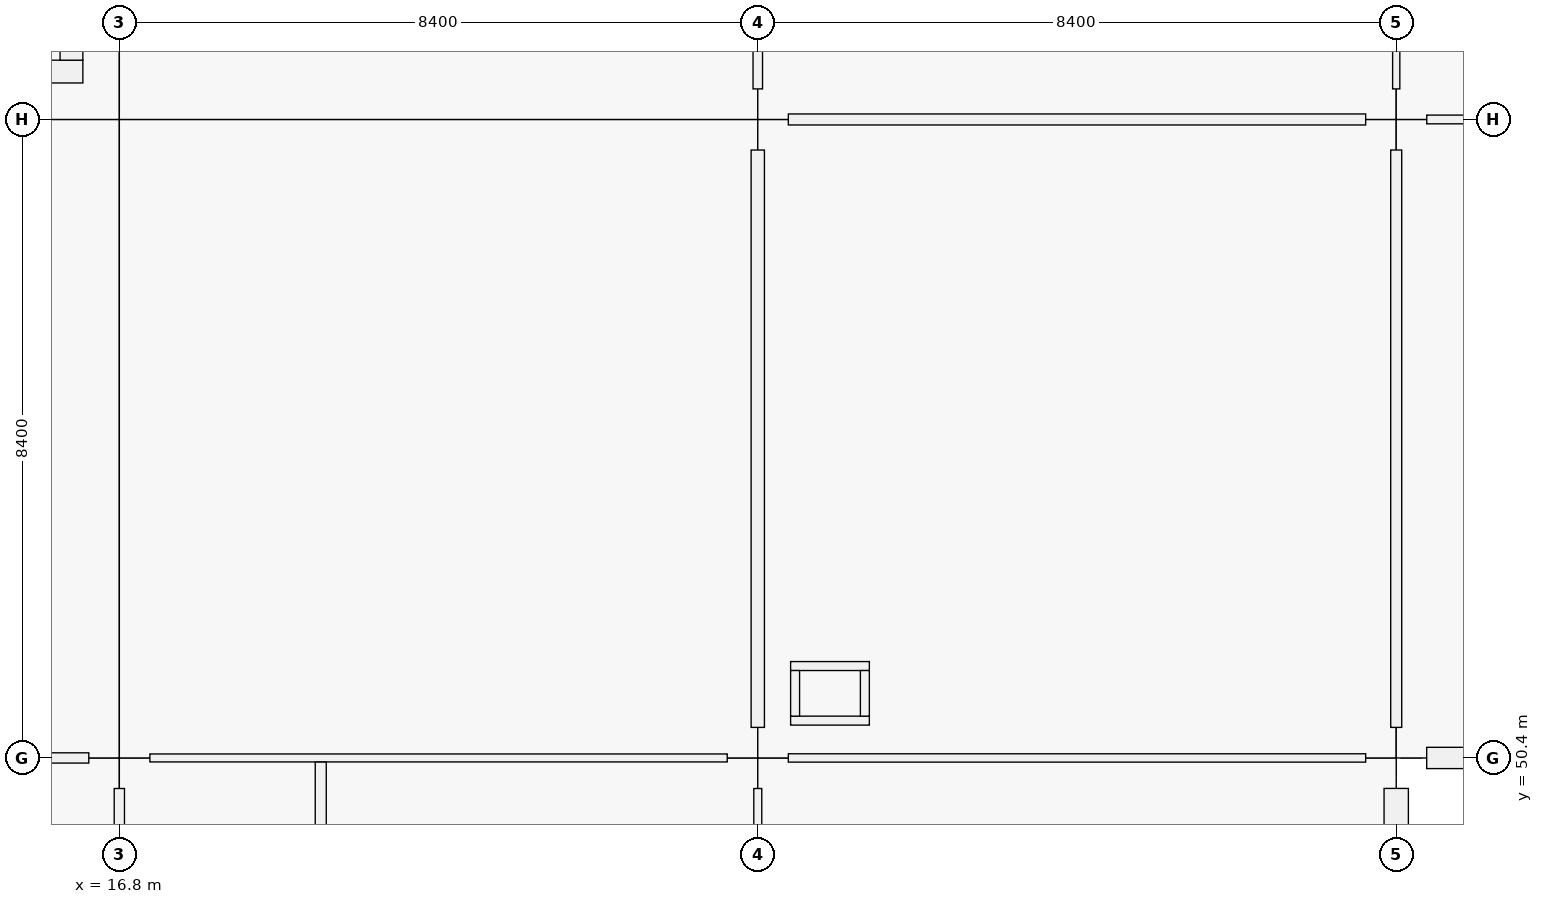
"""IFC4 building model, lengths in metres.
Left out: names, types, materials, properties, quantities, classifications, styles, units other than length and angle.
Written with IfcOpenShell. Run it as: python <this file> out.ifc"""

import sys

from ifc_helpers import new_model, si_unit, direction, frame, frame_2d, origin, origin_2d, place, context, subcontext, project, spatial, rectangle, extrude, element, fill, save


model = new_model("IFC4")
c1 = context("Model", 3, precision=1e-05, world=origin(), true_north=direction((0.0, 1.0)))
c2 = subcontext(c1, "Body", "Model", "MODEL_VIEW")
j1 = project(units=[si_unit("LENGTHUNIT", "METRE"), si_unit("PLANEANGLEUNIT", "RADIAN")], contexts=[c1])
p1 = place(None, origin())
s1 = spatial("IfcSite", under=j1, at=p1, CompositionType="ELEMENT")
p2 = place(p1, origin())
s2 = spatial("IfcBuilding", under=s1, at=p2, CompositionType="ELEMENT")
p3 = place(p2, frame((0.0, 0.0, 5.76)))
s3 = spatial("IfcBuildingStorey", under=s2, at=p3, CompositionType="ELEMENT", Elevation=5.76)
for number, where, z_axis, x_axis in (
    (1, (16.8, 50.4, 0.0), (0.0, 0.0, 1.0), (1.0, 0.0, 0.0)),
    (2, (16.8, 58.8, 0.0), (0.0, 0.0, 1.0), (1.0, 0.0, 0.0)),
    (3, (25.2, 50.4, 0.0), (0.0, 0.0, 1.0), (1.0, 0.0, 0.0)),
    (4, (25.2, 58.8, 0.0), (0.0, 0.0, 1.0), (1.0, 0.0, 0.0)),
    (5, (33.6, 50.4, 0.0), (0.0, 0.0, 1.0), (1.0, 0.0, 0.0)),
    (6, (33.6, 58.8, 0.0), (0.0, 0.0, 1.0), (1.0, 0.0, 0.0)),
):
    element("IfcColumn", number, at=place(p3, frame(where, z_axis=z_axis, x_axis=x_axis)), inside=s3, PredefinedType="COLUMN", context=c2, shape_type="SweptSolid", body=[
        extrude(rectangle(XDim=0.8, YDim=0.8, at=origin_2d()), origin(), (0.0, 0.0, 1.0), 4.5),
    ])
p4 = place(p3, frame((33.6, 49.999, 0.0), z_axis=(0.0, 0.0, 1.0), x_axis=(0.0, -1.0, 0.0)))
e7 = element("IfcWall", 7, at=p4, inside=s3, PredefinedType="SOLIDWALL", context=c2, shape_type="SweptSolid", body=[
    extrude(rectangle(XDim=7.598, YDim=0.32, at=frame_2d((3.799, 0.0))), origin(), (0.0, 0.0, 1.0), 3.4),
])
p5 = place(p4, frame((2.924, 0.0, 0.9)))
e8 = element("IfcOpeningElement", 8, at=p5, cuts=e7, PredefinedType="OPENING", context=c2, shape_type="SweptSolid", body=[
    extrude(rectangle(XDim=1.75, YDim=1.95, at=frame_2d((0.875, 0.975))), frame((0.0, 0.16, 0.0), z_axis=(0.0, -1.0, 0.0), x_axis=(1.0, 0.0, 0.0)), (0.0, 0.0, 1.0), 0.32),
])
p6 = place(p3, frame((41.649, 50.4, 0.0), z_axis=(0.0, 0.0, 1.0), x_axis=(-1.0, 0.0, 0.0)))
e9 = element("IfcWall", 9, at=p6, inside=s3, PredefinedType="SOLIDWALL", context=c2, shape_type="SweptSolid", body=[
    extrude(rectangle(XDim=7.648, YDim=0.28, at=frame_2d((3.824, 0.0))), origin(), (0.0, 0.0, 1.0), 3.4),
])
p7 = place(p3, frame((16.32, 59.43, 0.0), z_axis=(0.0, 0.0, 1.0), x_axis=(-1.0, 0.0, 0.0)))
e10 = element("IfcWall", 10, at=p7, inside=s3, PredefinedType="SHEAR", context=c2, shape_type="SweptSolid", body=[
    extrude(rectangle(XDim=7.44, YDim=0.3, at=frame_2d((3.72, 0.0))), origin(), (0.0, 0.0, 1.0), 4.5),
])
p8 = place(p7, frame((1.28, 0.0, 0.0)))
e11 = element("IfcOpeningElement", 11, at=p8, cuts=e10, PredefinedType="OPENING", context=c2, shape_type="SweptSolid", body=[
    extrude(rectangle(XDim=1.5, YDim=2.15, at=frame_2d((0.75, 1.075))), frame((0.0, 0.15, 0.0), z_axis=(0.0, -1.0, 0.0), x_axis=(1.0, 0.0, 0.0)), (0.0, 0.0, 1.0), 0.3),
])
p9 = place(p3, frame((16.17, 66.42, 0.0), z_axis=(0.0, 0.0, 1.0), x_axis=(0.0, -1.0, 0.0)))
e12 = element("IfcWall", 12, at=p9, inside=s3, PredefinedType="SHEAR", context=c2, shape_type="SweptSolid", body=[
    extrude(rectangle(XDim=6.84, YDim=0.3, at=frame_2d((3.42, 0.0))), origin(), (0.0, 0.0, 1.0), 4.5),
])
for number, where, z_axis, x_axis in (
    (13, (25.632, 50.891, 0.0), (0.0, 0.0, 1.0), (1.0, 0.0, 0.0)),
    (14, (25.632, 51.609, 0.0), (0.0, 0.0, 1.0), (1.0, 0.0, 0.0)),
):
    element("IfcWall", number, at=place(p3, frame(where, z_axis=z_axis, x_axis=x_axis)), inside=s3, PredefinedType="PARTITIONING", context=c2, shape_type="SweptSolid", body=[
        extrude(rectangle(XDim=1.036, YDim=0.118, at=frame_2d((0.518, 0.0))), origin(), (0.0, 0.0, 1.0), 3.48),
    ])
for number, where, z_axis, x_axis in (
    (15, (25.691, 50.95, 0.0), (0.0, 0.0, 1.0), (0.0, 1.0, 0.0)),
    (16, (26.609, 50.95, 0.0), (0.0, 0.0, 1.0), (0.0, 1.0, 0.0)),
):
    element("IfcWall", number, at=place(p3, frame(where, z_axis=z_axis, x_axis=x_axis)), inside=s3, PredefinedType="PARTITIONING", context=c2, shape_type="SweptSolid", body=[
        extrude(rectangle(XDim=0.6, YDim=0.118, at=frame_2d((0.3, 0.0))), origin(), (0.0, 0.0, 1.0), 3.48),
    ])
p10 = place(p3, frame((8.802, 50.4, 0.0), z_axis=(0.0, 0.0, 1.0), x_axis=(1.0, 0.0, 0.0)))
e17 = element("IfcWall", 17, at=p10, inside=s3, PredefinedType="PARTITIONING", context=c2, shape_type="SweptSolid", body=[
    extrude(rectangle(XDim=7.596, YDim=0.135, at=frame_2d((3.798, 0.0))), origin(), (0.0, 0.0, 1.0), 2.4),
])
p11 = place(p10, frame((3.328, 0.0, 0.0)))
e18 = element("IfcOpeningElement", 18, at=p11, cuts=e17, PredefinedType="OPENING", context=c2, shape_type="SweptSolid", body=[
    extrude(rectangle(XDim=0.94, YDim=2.15, at=frame_2d((0.47, 1.075))), frame((0.0, 0.067, 0.0), z_axis=(0.0, -1.0, 0.0), x_axis=(1.0, 0.0, 0.0)), (0.0, 0.0, 1.0), 0.135),
])
p12 = place(p3, frame((17.202, 50.4, 0.0), z_axis=(0.0, 0.0, 1.0), x_axis=(1.0, 0.0, 0.0)))
e19 = element("IfcWall", 19, at=p12, inside=s3, PredefinedType="PARTITIONING", context=c2, shape_type="SweptSolid", body=[
    extrude(rectangle(XDim=7.596, YDim=0.105, at=frame_2d((3.798, 0.0))), origin(), (0.0, 0.0, 1.0), 2.4),
])
p13 = place(p12, frame((0.583, 0.0, 0.0)))
e20 = element("IfcOpeningElement", 20, at=p13, cuts=e19, PredefinedType="OPENING", context=c2, shape_type="SweptSolid", body=[
    extrude(rectangle(XDim=0.96, YDim=2.1, at=frame_2d((0.48, 1.05))), frame((0.0, 0.052, 0.0), z_axis=(0.0, -1.0, 0.0), x_axis=(1.0, 0.0, 0.0)), (0.0, 0.0, 1.0), 0.105),
])
p14 = place(p12, frame((4.523, 0.0, 0.0)))
e21 = element("IfcOpeningElement", 21, at=p14, cuts=e19, PredefinedType="OPENING", context=c2, shape_type="SweptSolid", body=[
    extrude(rectangle(XDim=0.92, YDim=2.1, at=frame_2d((0.46, 1.05))), frame((0.0, 0.052, 0.0), z_axis=(0.0, -1.0, 0.0), x_axis=(1.0, 0.0, 0.0)), (0.0, 0.0, 1.0), 0.105),
])
p15 = place(p3, frame((25.602, 50.4, 0.0), z_axis=(0.0, 0.0, 1.0), x_axis=(1.0, 0.0, 0.0)))
e22 = element("IfcWall", 22, at=p15, inside=s3, PredefinedType="MOVABLE", context=c2, shape_type="SweptSolid", body=[
    extrude(rectangle(XDim=7.596, YDim=0.11, at=frame_2d((3.798, 0.0))), origin(), (0.0, 0.0, 1.0), 2.4),
])
p16 = place(p15, frame((3.258, 0.0, 0.0)))
e23 = element("IfcOpeningElement", 23, at=p16, cuts=e22, PredefinedType="OPENING", context=c2, shape_type="SweptSolid", body=[
    extrude(rectangle(XDim=1.08, YDim=2.22, at=frame_2d((0.54, 1.11))), frame((0.0, 0.055, 0.0), z_axis=(0.0, -1.0, 0.0), x_axis=(1.0, 0.0, 0.0)), (0.0, 0.0, 1.0), 0.11),
])
p17 = place(p3, frame((25.602, 58.8, 0.0), z_axis=(0.0, 0.0, 1.0), x_axis=(1.0, 0.0, 0.0)))
e24 = element("IfcWall", 24, at=p17, inside=s3, PredefinedType="PARTITIONING", context=c2, shape_type="SweptSolid", body=[
    extrude(rectangle(XDim=7.596, YDim=0.145, at=frame_2d((3.798, 0.0))), origin(), (0.0, 0.0, 1.0), 2.4),
])
p18 = place(p17, frame((3.268, 0.0, 0.0)))
e25 = element("IfcOpeningElement", 25, at=p18, cuts=e24, PredefinedType="OPENING", context=c2, shape_type="SweptSolid", body=[
    extrude(rectangle(XDim=1.06, YDim=2.22, at=frame_2d((0.53, 1.11))), frame((0.0, 0.073, 0.0), z_axis=(0.0, -1.0, 0.0), x_axis=(1.0, 0.0, 0.0)), (0.0, 0.0, 1.0), 0.145),
])
p19 = place(p3, frame((34.002, 58.8, 0.0), z_axis=(0.0, 0.0, 1.0), x_axis=(1.0, 0.0, 0.0)))
e26 = element("IfcWall", 26, at=p19, inside=s3, PredefinedType="PARTITIONING", context=c2, shape_type="SweptSolid", body=[
    extrude(rectangle(XDim=7.621, YDim=0.115, at=frame_2d((3.811, 0.0))), origin(), (0.0, 0.0, 1.0), 2.4),
])
p20 = place(p19, frame((3.28, 0.0, 0.0)))
e27 = element("IfcOpeningElement", 27, at=p20, cuts=e26, PredefinedType="OPENING", context=c2, shape_type="SweptSolid", body=[
    extrude(rectangle(XDim=1.06, YDim=2.22, at=frame_2d((0.53, 1.11))), frame((0.0, 0.058, 0.0), z_axis=(0.0, -1.0, 0.0), x_axis=(1.0, 0.0, 0.0)), (0.0, 0.0, 1.0), 0.115),
])
p21 = place(p3, frame((16.8, 42.402, 0.0), z_axis=(0.0, 0.0, 1.0), x_axis=(0.0, 1.0, 0.0)))
e28 = element("IfcWall", 28, at=p21, inside=s3, PredefinedType="PARTITIONING", context=c2, shape_type="SweptSolid", body=[
    extrude(rectangle(XDim=7.596, YDim=0.135, at=frame_2d((3.798, 0.0))), origin(), (0.0, 0.0, 1.0), 2.4),
])
p22 = place(p3, frame((25.2, 42.402, 0.0), z_axis=(0.0, 0.0, 1.0), x_axis=(0.0, 1.0, 0.0)))
e29 = element("IfcWall", 29, at=p22, inside=s3, PredefinedType="PARTITIONING", context=c2, shape_type="SweptSolid", body=[
    extrude(rectangle(XDim=7.596, YDim=0.105, at=frame_2d((3.798, 0.0))), origin(), (0.0, 0.0, 1.0), 2.4),
])
p23 = place(p3, frame((25.2, 50.802, 0.0), z_axis=(0.0, 0.0, 1.0), x_axis=(0.0, 1.0, 0.0)))
e30 = element("IfcWall", 30, at=p23, inside=s3, PredefinedType="PARTITIONING", context=c2, shape_type="SweptSolid", body=[
    extrude(rectangle(XDim=7.596, YDim=0.175, at=frame_2d((3.798, 0.0))), origin(), (0.0, 0.0, 1.0), 2.4),
])
p24 = place(p23, frame((3.288, 0.0, 0.0)))
e31 = element("IfcOpeningElement", 31, at=p24, cuts=e30, PredefinedType="OPENING", context=c2, shape_type="SweptSolid", body=[
    extrude(rectangle(XDim=1.02, YDim=2.2, at=frame_2d((0.51, 1.1))), frame((0.0, 0.087, 0.0), z_axis=(0.0, -1.0, 0.0), x_axis=(1.0, 0.0, 0.0)), (0.0, 0.0, 1.0), 0.175),
])
p25 = place(p3, frame((25.2, 59.202, 0.0), z_axis=(0.0, 0.0, 1.0), x_axis=(0.0, 1.0, 0.0)))
e32 = element("IfcWall", 32, at=p25, inside=s3, PredefinedType="PARTITIONING", context=c2, shape_type="SweptSolid", body=[
    extrude(rectangle(XDim=7.596, YDim=0.125, at=frame_2d((3.798, 0.0))), origin(), (0.0, 0.0, 1.0), 2.4),
])
p26 = place(p25, frame((3.298, 0.0, 0.0)))
e33 = element("IfcOpeningElement", 33, at=p26, cuts=e32, PredefinedType="OPENING", context=c2, shape_type="SweptSolid", body=[
    extrude(rectangle(XDim=1.0, YDim=2.2, at=frame_2d((0.5, 1.1))), frame((0.0, 0.062, 0.0), z_axis=(0.0, -1.0, 0.0), x_axis=(1.0, 0.0, 0.0)), (0.0, 0.0, 1.0), 0.125),
])
p27 = place(p3, frame((33.6, 50.802, 0.0), z_axis=(0.0, 0.0, 1.0), x_axis=(0.0, 1.0, 0.0)))
e34 = element("IfcWall", 34, at=p27, inside=s3, PredefinedType="PARTITIONING", context=c2, shape_type="SweptSolid", body=[
    extrude(rectangle(XDim=7.596, YDim=0.145, at=frame_2d((3.798, 0.0))), origin(), (0.0, 0.0, 1.0), 2.4),
])
p28 = place(p27, frame((3.318, 0.0, 0.0)))
e35 = element("IfcOpeningElement", 35, at=p28, cuts=e34, PredefinedType="OPENING", context=c2, shape_type="SweptSolid", body=[
    extrude(rectangle(XDim=0.96, YDim=2.18, at=frame_2d((0.48, 1.09))), frame((0.0, 0.073, 0.0), z_axis=(0.0, -1.0, 0.0), x_axis=(1.0, 0.0, 0.0)), (0.0, 0.0, 1.0), 0.145),
])
p29 = place(p3, frame((33.6, 59.202, 0.0), z_axis=(0.0, 0.0, 1.0), x_axis=(0.0, 1.0, 0.0)))
e36 = element("IfcWall", 36, at=p29, inside=s3, PredefinedType="PARTITIONING", context=c2, shape_type="SweptSolid", body=[
    extrude(rectangle(XDim=7.596, YDim=0.095, at=frame_2d((3.798, 0.0))), origin(), (0.0, 0.0, 1.0), 2.4),
])
p30 = place(p29, frame((3.308, 0.0, 0.0)))
e37 = element("IfcOpeningElement", 37, at=p30, cuts=e36, PredefinedType="OPENING", context=c2, shape_type="SweptSolid", body=[
    extrude(rectangle(XDim=0.98, YDim=2.18, at=frame_2d((0.49, 1.09))), frame((0.0, 0.047, 0.0), z_axis=(0.0, -1.0, 0.0), x_axis=(1.0, 0.0, 0.0)), (0.0, 0.0, 1.0), 0.095),
])
p31 = place(p3, frame((19.45, 42.08, 0.0), z_axis=(0.0, 0.0, 1.0), x_axis=(0.0, 1.0, 0.0)))
e38 = element("IfcWall", 38, at=p31, inside=s3, PredefinedType="PARTITIONING", context=c2, shape_type="SweptSolid", body=[
    extrude(rectangle(XDim=8.266, YDim=0.145, at=frame_2d((4.133, 0.0))), origin(), (0.0, 0.0, 1.0), 2.4),
])
p32 = place(p13, origin())
e39 = element("IfcDoor", 39, at=p32, inside=s3, OperationType="SINGLE_SWING_RIGHT", PredefinedType="DOOR", context=c2, shape_type="SweptSolid", body=[
    extrude(rectangle(XDim=0.96, YDim=2.1, at=frame_2d((0.48, 1.05))), frame((0.0, 0.025, 0.0), z_axis=(0.0, -1.0, 0.0), x_axis=(1.0, 0.0, 0.0)), (0.0, 0.0, 1.0), 0.05),
])
fill(e20, e39)
p33 = place(p14, origin())
e40 = element("IfcDoor", 40, at=p33, inside=s3, OperationType="SINGLE_SWING_LEFT", PredefinedType="DOOR", context=c2, shape_type="SweptSolid", body=[
    extrude(rectangle(XDim=0.92, YDim=2.1, at=frame_2d((0.46, 1.05))), frame((0.0, 0.025, 0.0), z_axis=(0.0, -1.0, 0.0), x_axis=(1.0, 0.0, 0.0)), (0.0, 0.0, 1.0), 0.05),
])
fill(e21, e40)
p34 = place(p24, origin())
e41 = element("IfcDoor", 41, at=p34, inside=s3, OperationType="SINGLE_SWING_LEFT", PredefinedType="DOOR", context=c2, shape_type="SweptSolid", body=[
    extrude(rectangle(XDim=1.02, YDim=2.2, at=frame_2d((0.51, 1.1))), frame((0.0, 0.025, 0.0), z_axis=(0.0, -1.0, 0.0), x_axis=(1.0, 0.0, 0.0)), (0.0, 0.0, 1.0), 0.05),
])
fill(e31, e41)
p35 = place(p28, origin())
e42 = element("IfcDoor", 42, at=p35, inside=s3, OperationType="SINGLE_SWING_RIGHT", PredefinedType="DOOR", context=c2, shape_type="SweptSolid", body=[
    extrude(rectangle(XDim=0.96, YDim=2.18, at=frame_2d((0.48, 1.09))), frame((0.0, 0.025, 0.0), z_axis=(0.0, -1.0, 0.0), x_axis=(1.0, 0.0, 0.0)), (0.0, 0.0, 1.0), 0.05),
])
fill(e35, e42)
p36 = place(p16, origin())
e43 = element("IfcDoor", 43, at=p36, inside=s3, OperationType="SINGLE_SWING_LEFT", PredefinedType="DOOR", context=c2, shape_type="SweptSolid", body=[
    extrude(rectangle(XDim=1.08, YDim=2.22, at=frame_2d((0.54, 1.11))), frame((0.0, 0.025, 0.0), z_axis=(0.0, -1.0, 0.0), x_axis=(1.0, 0.0, 0.0)), (0.0, 0.0, 1.0), 0.05),
])
fill(e23, e43)
p37 = place(p18, origin())
e44 = element("IfcDoor", 44, at=p37, inside=s3, OperationType="SINGLE_SWING_RIGHT", PredefinedType="DOOR", context=c2, shape_type="SweptSolid", body=[
    extrude(rectangle(XDim=1.06, YDim=2.22, at=frame_2d((0.53, 1.11))), frame((0.0, 0.025, 0.0), z_axis=(0.0, -1.0, 0.0), x_axis=(1.0, 0.0, 0.0)), (0.0, 0.0, 1.0), 0.05),
])
fill(e25, e44)
save(model, sys.argv[1])
